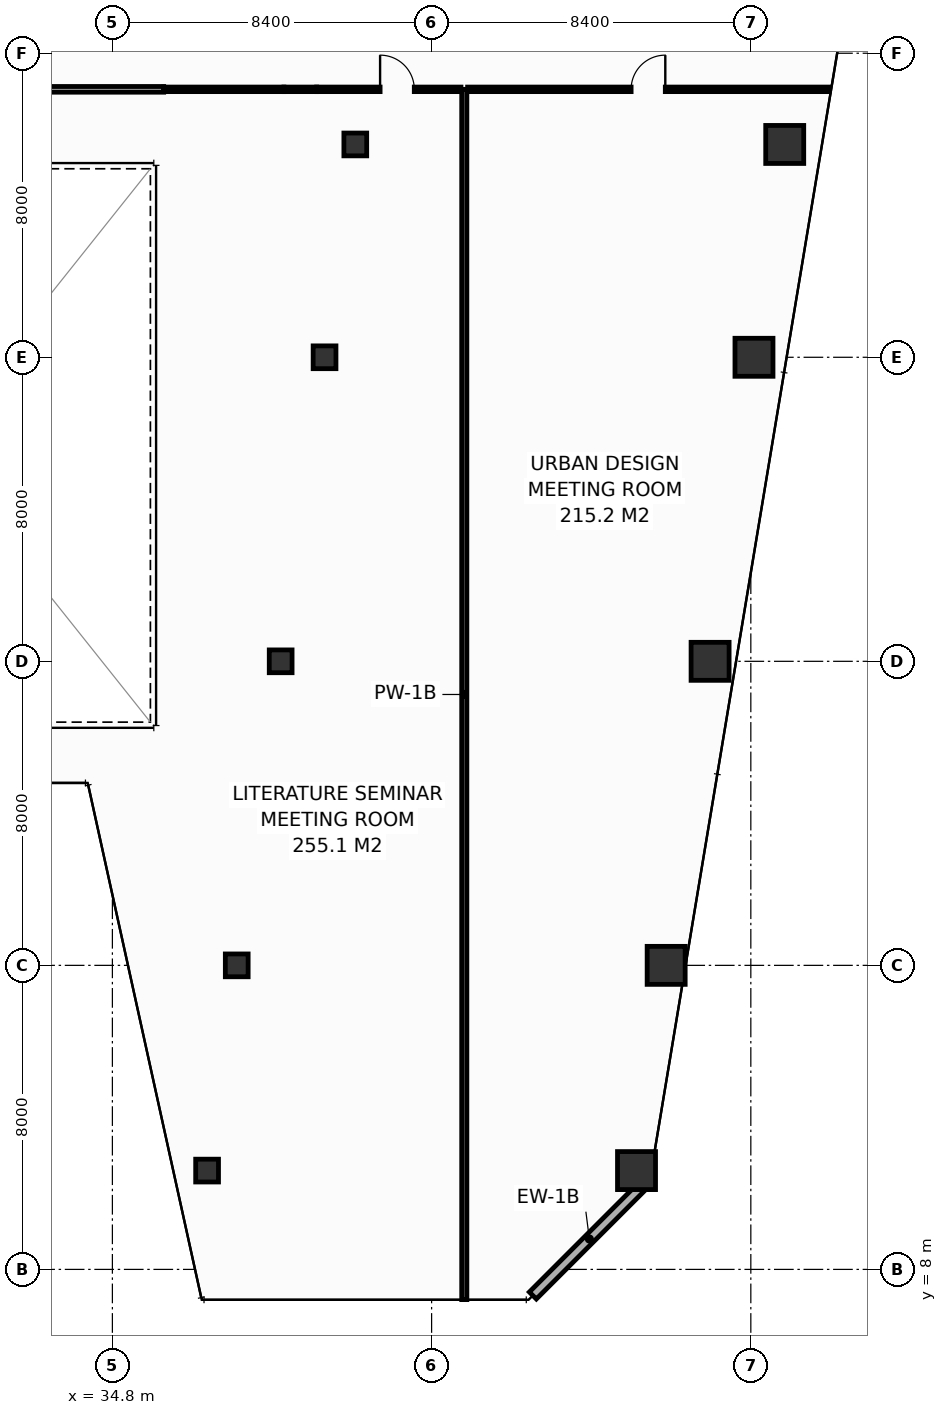
"""IFC4 building model, lengths in metres.
Left out: names, types, materials, properties, quantities, classifications, styles, units other than length and angle.
Written with IfcOpenShell. Run it as: python <this file> out.ifc"""

import sys

from ifc_helpers import new_model, si_unit, direction, frame, frame_2d, origin, origin_2d, place, context, subcontext, project, spatial, rectangle, hollow_rectangle, extrude, element, fill, save


model = new_model("IFC4")
c1 = context("Model", 3, precision=1e-05, world=origin(), true_north=direction((0.0, 1.0)))
c2 = subcontext(c1, "Body", "Model", "MODEL_VIEW")
j1 = project(units=[si_unit("LENGTHUNIT", "METRE"), si_unit("PLANEANGLEUNIT", "RADIAN")], contexts=[c1])
p1 = place(None, origin())
s1 = spatial("IfcSite", under=j1, at=p1, CompositionType="ELEMENT")
p2 = place(p1, origin())
s2 = spatial("IfcBuilding", under=s1, at=p2, CompositionType="ELEMENT")
p3 = place(p2, frame((0.0, 0.0, 163.8)))
s3 = spatial("IfcBuildingStorey", under=s2, at=p3, CompositionType="ELEMENT", Elevation=163.8)
p4 = place(p3, frame((48.592, 10.6, 0.0), z_axis=(0.0, 0.0, 1.0), x_axis=(1.0, 0.0, 0.0)))
e1 = element("IfcColumn", 1, at=p4, inside=s3, PredefinedType="COLUMN", context=c2, shape_type="SweptSolid", body=[
    extrude(hollow_rectangle(XDim=1.0, YDim=1.0, WallThickness=0.045, at=origin_2d()), origin(), (0.0, 0.0, 1.0), 3.8),
])
p5 = place(p3, frame((37.292, 10.6, 0.0), z_axis=(0.0, 0.0, 1.0), x_axis=(1.0, 0.0, 0.0)))
e2 = element("IfcColumn", 2, at=p5, inside=s3, PredefinedType="COLUMN", context=c2, shape_type="SweptSolid", body=[
    extrude(hollow_rectangle(XDim=0.6, YDim=0.6, WallThickness=0.028, at=origin_2d()), origin(), (0.0, 0.0, 1.0), 3.8),
])
p6 = place(p3, frame((49.372, 16.0, 0.0), z_axis=(0.0, 0.0, 1.0), x_axis=(1.0, 0.0, 0.0)))
e3 = element("IfcColumn", 3, at=p6, inside=s3, PredefinedType="COLUMN", context=c2, shape_type="SweptSolid", body=[
    extrude(hollow_rectangle(XDim=1.0, YDim=1.0, WallThickness=0.045, at=origin_2d()), origin(), (0.0, 0.0, 1.0), 3.8),
])
p7 = place(p3, frame((38.072, 16.0, 0.0), z_axis=(0.0, 0.0, 1.0), x_axis=(1.0, 0.0, 0.0)))
e4 = element("IfcColumn", 4, at=p7, inside=s3, PredefinedType="COLUMN", context=c2, shape_type="SweptSolid", body=[
    extrude(hollow_rectangle(XDim=0.6, YDim=0.6, WallThickness=0.028, at=origin_2d()), origin(), (0.0, 0.0, 1.0), 3.8),
])
p8 = place(p3, frame((50.528, 24.0, 0.0), z_axis=(0.0, 0.0, 1.0), x_axis=(1.0, 0.0, 0.0)))
e5 = element("IfcColumn", 5, at=p8, inside=s3, PredefinedType="COLUMN", context=c2, shape_type="SweptSolid", body=[
    extrude(hollow_rectangle(XDim=1.0, YDim=1.0, WallThickness=0.045, at=origin_2d()), origin(), (0.0, 0.0, 1.0), 3.8),
])
p9 = place(p3, frame((39.228, 24.0, 0.0), z_axis=(0.0, 0.0, 1.0), x_axis=(1.0, 0.0, 0.0)))
e6 = element("IfcColumn", 6, at=p9, inside=s3, PredefinedType="COLUMN", context=c2, shape_type="SweptSolid", body=[
    extrude(hollow_rectangle(XDim=0.6, YDim=0.6, WallThickness=0.028, at=origin_2d()), origin(), (0.0, 0.0, 1.0), 3.8),
])
p10 = place(p3, frame((51.683, 32.0, 0.0), z_axis=(0.0, 0.0, 1.0), x_axis=(1.0, 0.0, 0.0)))
e7 = element("IfcColumn", 7, at=p10, inside=s3, PredefinedType="COLUMN", context=c2, shape_type="SweptSolid", body=[
    extrude(hollow_rectangle(XDim=1.0, YDim=1.0, WallThickness=0.045, at=origin_2d()), origin(), (0.0, 0.0, 1.0), 3.8),
])
p11 = place(p3, frame((40.383, 32.0, 0.0), z_axis=(0.0, 0.0, 1.0), x_axis=(1.0, 0.0, 0.0)))
e8 = element("IfcColumn", 8, at=p11, inside=s3, PredefinedType="COLUMN", context=c2, shape_type="SweptSolid", body=[
    extrude(hollow_rectangle(XDim=0.6, YDim=0.6, WallThickness=0.028, at=origin_2d()), origin(), (0.0, 0.0, 1.0), 3.8),
])
p12 = place(p3, frame((52.492, 37.6, 0.0), z_axis=(0.0, 0.0, 1.0), x_axis=(1.0, 0.0, 0.0)))
e9 = element("IfcColumn", 9, at=p12, inside=s3, PredefinedType="COLUMN", context=c2, shape_type="SweptSolid", body=[
    extrude(hollow_rectangle(XDim=1.0, YDim=1.0, WallThickness=0.045, at=origin_2d()), origin(), (0.0, 0.0, 1.0), 3.8),
])
p13 = place(p3, frame((41.192, 37.6, 0.0), z_axis=(0.0, 0.0, 1.0), x_axis=(1.0, 0.0, 0.0)))
e10 = element("IfcColumn", 10, at=p13, inside=s3, PredefinedType="COLUMN", context=c2, shape_type="SweptSolid", body=[
    extrude(hollow_rectangle(XDim=0.6, YDim=0.6, WallThickness=0.028, at=origin_2d()), origin(), (0.0, 0.0, 1.0), 3.8),
])
p14 = place(p3, frame((45.864, 7.313, 0.0), z_axis=(0.0, 0.0, 1.0), x_axis=(0.70707775441, 0.707135806771, 0.0)))
e11 = element("IfcWall", 11, at=p14, inside=s3, PredefinedType="STANDARD", context=c2, shape_type="SweptSolid", body=[
    extrude(rectangle(XDim=4.206, YDim=0.26, at=frame_2d((2.103, 0.0))), origin(), (0.0, 0.0, 1.0), 3.55),
])
p15 = place(p3, frame((44.06, 7.205, 0.0), z_axis=(0.0, 0.0, 1.0), x_axis=(0.0, 1.0, 0.0)))
e12 = element("IfcWall", 12, at=p15, inside=s3, PredefinedType="PARTITIONING", context=c2, shape_type="SweptSolid", body=[
    extrude(rectangle(XDim=31.845, YDim=0.135, at=frame_2d((15.922, 0.0))), origin(), (0.0, 0.0, 1.0), 1.735),
])
p16 = place(p3, frame((23.85, 39.05, 0.0), z_axis=(0.0, 0.0, 1.0), x_axis=(1.0, 0.0, 0.0)))
e13 = element("IfcWall", 13, at=p16, inside=s3, PredefinedType="PARTITIONING", context=c2, shape_type="SweptSolid", body=[
    extrude(rectangle(XDim=12.3, YDim=0.15, at=frame_2d((6.15, 0.0))), origin(), (0.0, 0.0, 1.0), 3.55),
])
p17 = place(p3, frame((40.175, 39.05, 0.0), z_axis=(0.0, 0.0, 1.0), x_axis=(1.0, 0.0, 0.0)))
e14 = element("IfcWall", 14, at=p17, inside=s3, PredefinedType="PARTITIONING", context=c2, shape_type="SweptSolid", body=[
    extrude(rectangle(XDim=3.797, YDim=0.12, at=frame_2d((1.898, 0.0))), origin(), (0.0, 0.0, 1.0), 3.55),
])
p18 = place(p17, frame((1.669, 0.0, 0.0)))
e15 = element("IfcOpeningElement", 15, at=p18, cuts=e14, PredefinedType="OPENING", context=c2, shape_type="SweptSolid", body=[
    extrude(rectangle(XDim=0.9, YDim=2.1, at=frame_2d((0.45, 1.05))), frame((0.0, 0.07, 0.0), z_axis=(0.0, -1.0, 0.0), x_axis=(1.0, 0.0, 0.0)), (0.0, 0.0, 1.0), 0.14),
])
p19 = place(p3, frame((36.15, 39.05, 0.0), z_axis=(0.0, 0.0, 1.0), x_axis=(1.0, 0.0, 0.0)))
e16 = element("IfcWall", 16, at=p19, inside=s3, PredefinedType="PARTITIONING", context=c2, shape_type="SweptSolid", body=[
    extrude(rectangle(XDim=3.164, YDim=0.12, at=frame_2d((1.582, 0.0))), origin(), (0.0, 0.0, 1.0), 3.55),
])
p20 = place(p3, frame((39.313, 39.05, 0.0), z_axis=(0.0, 0.0, 1.0), x_axis=(1.0, 0.0, 0.0)))
e17 = element("IfcWall", 17, at=p20, inside=s3, PredefinedType="PARTITIONING", context=c2, shape_type="SweptSolid", body=[
    extrude(rectangle(XDim=0.862, YDim=0.12, at=frame_2d((0.431, 0.0))), origin(), (0.0, 0.0, 1.0), 2.135),
])
p21 = place(p3, frame((44.147, 39.05, 0.0), z_axis=(0.0, 0.0, 1.0), x_axis=(1.0, 0.0, 0.0)))
e18 = element("IfcWall", 18, at=p21, inside=s3, PredefinedType="PARTITIONING", context=c2, shape_type="SweptSolid", body=[
    extrude(rectangle(XDim=9.504, YDim=0.12, at=frame_2d((4.752, 0.0))), origin(), (0.0, 0.0, 1.0), 3.035),
])
p22 = place(p21, frame((4.302, 0.0, 0.0)))
e19 = element("IfcOpeningElement", 19, at=p22, cuts=e18, PredefinedType="OPENING", context=c2, shape_type="SweptSolid", body=[
    extrude(rectangle(XDim=0.9, YDim=2.1, at=frame_2d((0.45, 1.05))), frame((0.0, 0.07, 0.0), z_axis=(0.0, -1.0, 0.0), x_axis=(1.0, 0.0, 0.0)), (0.0, 0.0, 1.0), 0.14),
])
p23 = place(p18, origin())
e20 = element("IfcDoor", 20, at=p23, inside=s3, OperationType="SINGLE_SWING_LEFT", PredefinedType="DOOR", context=c2, shape_type="SweptSolid", body=[
    extrude(rectangle(XDim=0.9, YDim=2.1, at=frame_2d((0.45, 1.05))), frame((0.0, 0.025, 0.0), z_axis=(0.0, -1.0, 0.0), x_axis=(1.0, 0.0, 0.0)), (0.0, 0.0, 1.0), 0.05),
])
fill(e15, e20)
p24 = place(p22, origin())
e21 = element("IfcDoor", 21, at=p24, inside=s3, OperationType="SINGLE_SWING_RIGHT", PredefinedType="DOOR", context=c2, shape_type="SweptSolid", body=[
    extrude(rectangle(XDim=0.9, YDim=2.1, at=frame_2d((0.45, 1.05))), frame((0.0, 0.025, 0.0), z_axis=(0.0, -1.0, 0.0), x_axis=(1.0, 0.0, 0.0)), (0.0, 0.0, 1.0), 0.05),
])
fill(e19, e21)
save(model, sys.argv[1])
